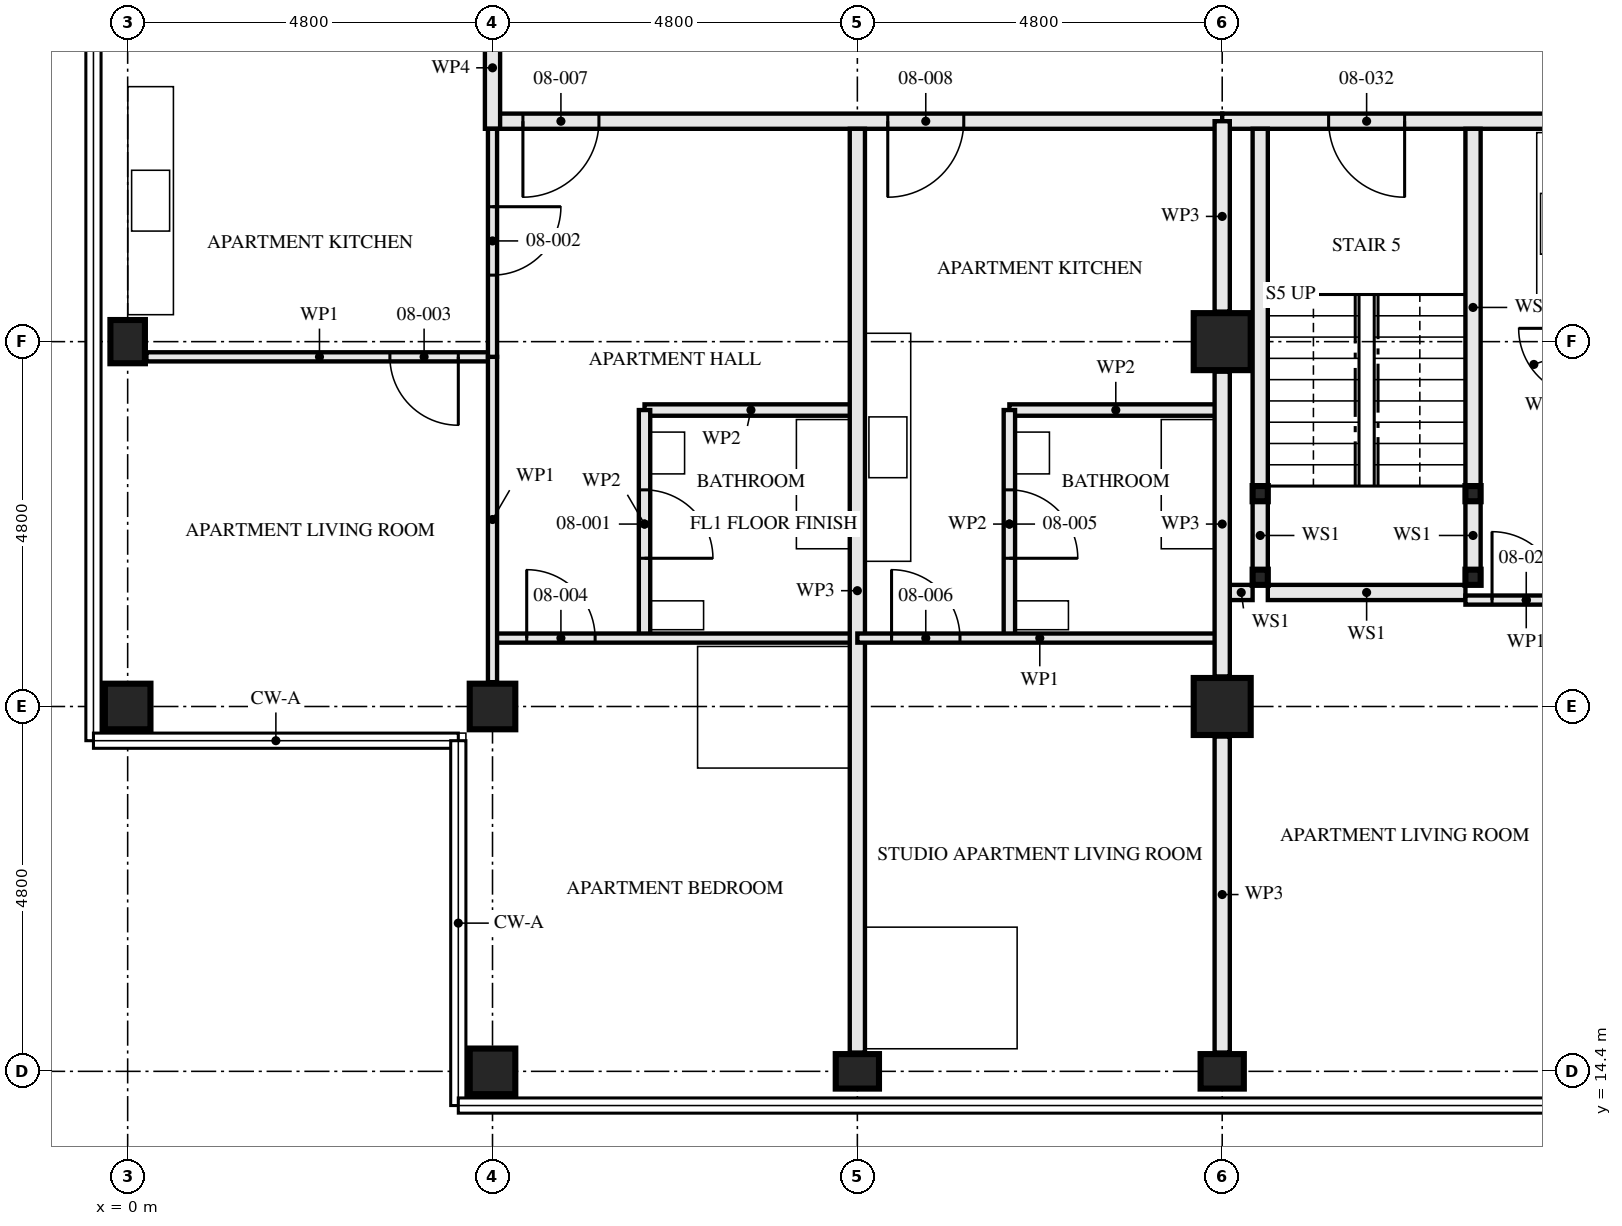
"""IFC4 building model, lengths in metres.
Left out: names, types, materials, properties, quantities, classifications, styles, units other than length and angle.
Written with IfcOpenShell. Run it as: python <this file> out.ifc"""

import sys

from ifc_helpers import new_model, si_unit, direction, frame, frame_2d, origin, origin_2d, place, context, subcontext, project, spatial, rectangle, hollow_rectangle, i_section, extrude, element, fill, save


model = new_model("IFC4")
c1 = context("Model", 3, precision=1e-05, world=origin(), true_north=direction((0.0, 1.0)))
c2 = subcontext(c1, "Body", "Model", "MODEL_VIEW")
j1 = project(units=[si_unit("LENGTHUNIT", "METRE"), si_unit("PLANEANGLEUNIT", "RADIAN")], contexts=[c1])
p1 = place(None, origin())
s1 = spatial("IfcSite", under=j1, at=p1, CompositionType="ELEMENT")
p2 = place(p1, origin())
s2 = spatial("IfcBuilding", under=s1, at=p2, CompositionType="ELEMENT")
p3 = place(p2, frame((0.0, 0.0, 34.0)))
s3 = spatial("IfcBuildingStorey", under=s2, at=p3, CompositionType="ELEMENT", Elevation=34.0)
p4 = place(p3, frame((0.0, 19.2, 0.0), z_axis=(0.0, 0.0, 1.0), x_axis=(0.0, 1.0, 0.0)))
e1 = element("IfcColumn", 1, at=p4, inside=s3, PredefinedType="COLUMN", context=c2, shape_type="SweptSolid", body=[
    extrude(hollow_rectangle(XDim=0.6, YDim=0.6, WallThickness=0.05, at=origin_2d()), origin(), (0.0, 0.0, 1.0), 3.5),
])
p5 = place(p3, frame((0.0, 24.0, 0.0), z_axis=(0.0, 0.0, 1.0), x_axis=(1.0, 0.0, 0.0)))
e2 = element("IfcColumn", 2, at=p5, inside=s3, PredefinedType="COLUMN", context=c2, shape_type="SweptSolid", body=[
    extrude(i_section(OverallWidth=0.454, OverallDepth=0.569, WebThickness=0.078, FlangeThickness=0.125, FilletRadius=0.015, at=origin_2d()), origin(), (0.0, 0.0, 1.0), 3.5),
])
for number, where, z_axis, x_axis in (
    (3, (4.8, 14.4, 0.0), (0.0, 0.0, 1.0), (0.0, 1.0, 0.0)),
    (4, (4.8, 19.2, 0.0), (0.0, 0.0, 1.0), (0.0, 1.0, 0.0)),
):
    element("IfcColumn", number, at=place(p3, frame(where, z_axis=z_axis, x_axis=x_axis)), inside=s3, PredefinedType="COLUMN", context=c2, shape_type="SweptSolid", body=[
        extrude(hollow_rectangle(XDim=0.6, YDim=0.6, WallThickness=0.05, at=origin_2d()), origin(), (0.0, 0.0, 1.0), 3.5),
    ])
for number, where, z_axis, x_axis in (
    (5, (9.6, 14.4, 0.0), (0.0, 0.0, 1.0), (0.0, 1.0, 0.0)),
    (6, (14.4, 14.4, 0.0), (0.0, 0.0, 1.0), (0.0, 1.0, 0.0)),
):
    element("IfcColumn", number, at=place(p3, frame(where, z_axis=z_axis, x_axis=x_axis)), inside=s3, PredefinedType="COLUMN", context=c2, shape_type="SweptSolid", body=[
        extrude(i_section(OverallWidth=0.454, OverallDepth=0.569, WebThickness=0.078, FlangeThickness=0.125, FilletRadius=0.015, at=origin_2d()), origin(), (0.0, 0.0, 1.0), 3.5),
    ])
for number, where, z_axis, x_axis in (
    (7, (14.4, 19.2, 0.0), (0.0, 0.0, 1.0), (1.0, 0.0, 0.0)),
    (8, (14.4, 24.0, 0.0), (0.0, 0.0, 1.0), (1.0, 0.0, 0.0)),
):
    element("IfcColumn", number, at=place(p3, frame(where, z_axis=z_axis, x_axis=x_axis)), inside=s3, PredefinedType="COLUMN", context=c2, shape_type="SweptSolid", body=[
        extrude(hollow_rectangle(XDim=0.75, YDim=0.75, WallThickness=0.08, at=origin_2d()), origin(), (0.0, 0.0, 1.0), 3.5),
    ])
for number, where, z_axis, x_axis in (
    (9, (14.9, 20.9, 0.0), (0.0, 0.0, 1.0), (1.0, 0.0, 0.0)),
    (10, (17.7, 20.9, 0.0), (0.0, 0.0, 1.0), (1.0, 0.0, 0.0)),
    (11, (14.9, 22.0, 0.0), (0.0, 0.0, 1.0), (1.0, 0.0, 0.0)),
    (12, (17.7, 22.0, 0.0), (0.0, 0.0, 1.0), (1.0, 0.0, 0.0)),
):
    element("IfcColumn", number, at=place(p3, frame(where, z_axis=z_axis, x_axis=x_axis)), inside=s3, PredefinedType="COLUMN", context=c2, shape_type="SweptSolid", body=[
        extrude(hollow_rectangle(XDim=0.2, YDim=0.2, WallThickness=0.008, at=origin_2d()), origin(), (0.0, 0.0, 1.0), 3.33),
    ])
p6 = place(p3, frame((6.8, 20.1, 0.0), z_axis=(0.0, 0.0, 1.0), x_axis=(0.0, 1.0, 0.0)))
e13 = element("IfcWall", 13, at=p6, inside=s3, PredefinedType="PARTITIONING", context=c2, shape_type="SweptSolid", body=[
    extrude(rectangle(XDim=3.0, YDim=0.15, at=frame_2d((1.5, 0.0))), origin(), (0.0, 0.0, 1.0), 3.33),
])
p7 = place(p6, frame((1.05, 0.0, 0.0)))
e14 = element("IfcOpeningElement", 14, at=p7, cuts=e13, PredefinedType="OPENING", context=c2, shape_type="SweptSolid", body=[
    extrude(rectangle(XDim=0.9, YDim=2.1, at=frame_2d((0.45, 1.05))), frame((0.0, 0.085, 0.0), z_axis=(0.0, -1.0, 0.0), x_axis=(1.0, 0.0, 0.0)), (0.0, 0.0, 1.0), 0.171),
])
p8 = place(p3, frame((6.8, 23.1, 0.0), z_axis=(0.0, 0.0, 1.0), x_axis=(1.0, 0.0, 0.0)))
e15 = element("IfcWall", 15, at=p8, inside=s3, PredefinedType="PARTITIONING", context=c2, shape_type="SweptSolid", body=[
    extrude(rectangle(XDim=2.8, YDim=0.15, at=frame_2d((1.4, 0.0))), origin(), (0.0, 0.0, 1.0), 3.33),
])
p9 = place(p3, frame((4.8, 23.8, 0.0), z_axis=(0.0, 0.0, 1.0), x_axis=(0.0, 1.0, 0.0)))
e16 = element("IfcWall", 16, at=p9, inside=s3, PredefinedType="PARTITIONING", context=c2, shape_type="SweptSolid", body=[
    extrude(rectangle(XDim=3.0, YDim=0.12, at=frame_2d((1.5, 0.0))), origin(), (0.0, 0.0, 1.0), 2.55),
])
p10 = place(p9, frame((1.075, 0.0, 0.0)))
e17 = element("IfcOpeningElement", 17, at=p10, cuts=e16, PredefinedType="OPENING", context=c2, shape_type="SweptSolid", body=[
    extrude(rectangle(XDim=0.9, YDim=2.1, at=frame_2d((0.45, 1.05))), frame((0.0, 0.071, 0.0), z_axis=(0.0, -1.0, 0.0), x_axis=(1.0, 0.0, 0.0)), (0.0, 0.0, 1.0), 0.141),
])
p11 = place(p3, frame((0.247, 23.8, 0.0), z_axis=(0.0, 0.0, 1.0), x_axis=(1.0, 0.0, 0.0)))
e18 = element("IfcWall", 18, at=p11, inside=s3, PredefinedType="PARTITIONING", context=c2, shape_type="SweptSolid", body=[
    extrude(rectangle(XDim=4.553, YDim=0.12, at=frame_2d((2.276, 0.0))), origin(), (0.0, 0.0, 1.0), 3.33),
])
p12 = place(p11, frame((3.203, 0.0, 0.0)))
e19 = element("IfcOpeningElement", 19, at=p12, cuts=e18, PredefinedType="OPENING", context=c2, shape_type="SweptSolid", body=[
    extrude(rectangle(XDim=0.9, YDim=2.1, at=frame_2d((0.45, 1.05))), frame((0.0, 0.071, 0.0), z_axis=(0.0, -1.0, 0.0), x_axis=(1.0, 0.0, 0.0)), (0.0, 0.0, 1.0), 0.141),
])
p13 = place(p3, frame((4.8, 20.1, 0.0), z_axis=(0.0, 0.0, 1.0), x_axis=(1.0, 0.0, 0.0)))
e20 = element("IfcWall", 20, at=p13, inside=s3, PredefinedType="PARTITIONING", context=c2, shape_type="SweptSolid", body=[
    extrude(rectangle(XDim=4.8, YDim=0.12, at=frame_2d((2.4, 0.0))), origin(), (0.0, 0.0, 1.0), 3.33),
])
p14 = place(p13, frame((0.45, 0.0, 0.0)))
e21 = element("IfcOpeningElement", 21, at=p14, cuts=e20, PredefinedType="OPENING", context=c2, shape_type="SweptSolid", body=[
    extrude(rectangle(XDim=0.9, YDim=2.1, at=frame_2d((0.45, 1.05))), frame((0.0, 0.071, 0.0), z_axis=(0.0, -1.0, 0.0), x_axis=(1.0, 0.0, 0.0)), (0.0, 0.0, 1.0), 0.141),
])
p15 = place(p3, frame((4.8, 19.52, 0.0), z_axis=(0.0, 0.0, 1.0), x_axis=(0.0, 1.0, 0.0)))
e22 = element("IfcWall", 22, at=p15, inside=s3, PredefinedType="PARTITIONING", context=c2, shape_type="SweptSolid", body=[
    extrude(rectangle(XDim=4.28, YDim=0.12, at=frame_2d((2.14, 0.0))), origin(), (0.0, 0.0, 1.0), 3.33),
])
p16 = place(p3, frame((9.6, 14.647, 0.0), z_axis=(0.0, 0.0, 1.0), x_axis=(0.0, 1.0, 0.0)))
e23 = element("IfcWall", 23, at=p16, inside=s3, PredefinedType="PARTITIONING", context=c2, shape_type="SweptSolid", body=[
    extrude(rectangle(XDim=12.153, YDim=0.2, at=frame_2d((6.077, 0.0))), origin(), (0.0, 0.0, 1.0), 2.55),
])
p17 = place(p3, frame((11.6, 20.1, 0.0), z_axis=(0.0, 0.0, 1.0), x_axis=(0.0, 1.0, 0.0)))
e24 = element("IfcWall", 24, at=p17, inside=s3, PredefinedType="PARTITIONING", context=c2, shape_type="SweptSolid", body=[
    extrude(rectangle(XDim=3.0, YDim=0.15, at=frame_2d((1.5, 0.0))), origin(), (0.0, 0.0, 1.0), 3.33),
])
p18 = place(p17, frame((1.05, 0.0, 0.0)))
e25 = element("IfcOpeningElement", 25, at=p18, cuts=e24, PredefinedType="OPENING", context=c2, shape_type="SweptSolid", body=[
    extrude(rectangle(XDim=0.9, YDim=2.1, at=frame_2d((0.45, 1.05))), frame((0.0, 0.085, 0.0), z_axis=(0.0, -1.0, 0.0), x_axis=(1.0, 0.0, 0.0)), (0.0, 0.0, 1.0), 0.171),
])
p19 = place(p3, frame((11.6, 23.1, 0.0), z_axis=(0.0, 0.0, 1.0), x_axis=(1.0, 0.0, 0.0)))
e26 = element("IfcWall", 26, at=p19, inside=s3, PredefinedType="PARTITIONING", context=c2, shape_type="SweptSolid", body=[
    extrude(rectangle(XDim=2.8, YDim=0.15, at=frame_2d((1.4, 0.0))), origin(), (0.0, 0.0, 1.0), 3.33),
])
p20 = place(p3, frame((9.6, 20.1, 0.0), z_axis=(0.0, 0.0, 1.0), x_axis=(1.0, 0.0, 0.0)))
e27 = element("IfcWall", 27, at=p20, inside=s3, PredefinedType="PARTITIONING", context=c2, shape_type="SweptSolid", body=[
    extrude(rectangle(XDim=4.8, YDim=0.12, at=frame_2d((2.4, 0.0))), origin(), (0.0, 0.0, 1.0), 3.33),
])
p21 = place(p20, frame((0.45, 0.0, 0.0)))
e28 = element("IfcOpeningElement", 28, at=p21, cuts=e27, PredefinedType="OPENING", context=c2, shape_type="SweptSolid", body=[
    extrude(rectangle(XDim=0.9, YDim=2.1, at=frame_2d((0.45, 1.05))), frame((0.0, 0.071, 0.0), z_axis=(0.0, -1.0, 0.0), x_axis=(1.0, 0.0, 0.0)), (0.0, 0.0, 1.0), 0.141),
])
p22 = place(p3, frame((4.8, 26.9, 0.0), z_axis=(0.0, 0.0, 1.0), x_axis=(1.0, 0.0, 0.0)))
e29 = element("IfcWall", 29, at=p22, inside=s3, PredefinedType="PARTITIONING", context=c2, shape_type="SweptSolid", body=[
    extrude(rectangle(XDim=9.6, YDim=0.2, at=frame_2d((4.8, 0.0))), origin(), (0.0, 0.0, 1.0), 3.33),
])
p23 = place(p22, frame((0.4, 0.0, 0.0)))
e30 = element("IfcOpeningElement", 30, at=p23, cuts=e29, PredefinedType="OPENING", context=c2, shape_type="SweptSolid", body=[
    extrude(rectangle(XDim=1.0, YDim=2.1, at=frame_2d((0.5, 1.05))), frame((0.0, 0.111, 0.0), z_axis=(0.0, -1.0, 0.0), x_axis=(1.0, 0.0, 0.0)), (0.0, 0.0, 1.0), 0.221),
])
p24 = place(p22, frame((5.2, 0.0, 0.0)))
e31 = element("IfcOpeningElement", 31, at=p24, cuts=e29, PredefinedType="OPENING", context=c2, shape_type="SweptSolid", body=[
    extrude(rectangle(XDim=1.0, YDim=2.1, at=frame_2d((0.5, 1.05))), frame((0.0, 0.111, 0.0), z_axis=(0.0, -1.0, 0.0), x_axis=(1.0, 0.0, 0.0)), (0.0, 0.0, 1.0), 0.221),
])
p25 = place(p3, frame((4.8, 26.8, 0.0), z_axis=(0.0, 0.0, 1.0), x_axis=(0.0, 1.0, 0.0)))
e32 = element("IfcWall", 32, at=p25, inside=s3, PredefinedType="PARTITIONING", context=c2, shape_type="SweptSolid", body=[
    extrude(rectangle(XDim=1.605, YDim=0.2, at=frame_2d((0.802, 0.0))), origin(), (0.0, 0.0, 1.0), 3.33),
])
p26 = place(p3, frame((14.9, 21.0, 0.0), z_axis=(0.0, 0.0, 1.0), x_axis=(0.0, 1.0, 0.0)))
e33 = element("IfcWall", 33, at=p26, inside=s3, PredefinedType="SOLIDWALL", context=c2, shape_type="SweptSolid", body=[
    extrude(rectangle(XDim=0.9, YDim=0.2, at=frame_2d((0.45, 0.0))), origin(), (0.0, 0.0, 1.0), 2.99),
])
p27 = place(p3, frame((14.9, 22.1, 0.0), z_axis=(0.0, 0.0, 1.0), x_axis=(0.0, 1.0, 0.0)))
e34 = element("IfcWall", 34, at=p27, inside=s3, PredefinedType="SOLIDWALL", context=c2, shape_type="SweptSolid", body=[
    extrude(rectangle(XDim=4.7, YDim=0.2, at=frame_2d((2.35, 0.0))), origin(), (0.0, 0.0, 1.0), 2.99),
])
p28 = place(p3, frame((17.7, 21.0, 0.0), z_axis=(0.0, 0.0, 1.0), x_axis=(0.0, 1.0, 0.0)))
e35 = element("IfcWall", 35, at=p28, inside=s3, PredefinedType="SOLIDWALL", context=c2, shape_type="SweptSolid", body=[
    extrude(rectangle(XDim=0.9, YDim=0.2, at=frame_2d((0.45, 0.0))), origin(), (0.0, 0.0, 1.0), 2.99),
])
p29 = place(p3, frame((17.7, 22.1, 0.0), z_axis=(0.0, 0.0, 1.0), x_axis=(0.0, 1.0, 0.0)))
e36 = element("IfcWall", 36, at=p29, inside=s3, PredefinedType="SOLIDWALL", context=c2, shape_type="SweptSolid", body=[
    extrude(rectangle(XDim=4.7, YDim=0.2, at=frame_2d((2.35, 0.0))), origin(), (0.0, 0.0, 1.0), 2.99),
])
p30 = place(p3, frame((14.5, 20.7, 0.0), z_axis=(0.0, 0.0, 1.0), x_axis=(1.0, 0.0, 0.0)))
e37 = element("IfcWall", 37, at=p30, inside=s3, PredefinedType="SOLIDWALL", context=c2, shape_type="SweptSolid", body=[
    extrude(rectangle(XDim=0.3, YDim=0.2, at=frame_2d((0.15, 0.0))), origin(), (0.0, 0.0, 1.0), 3.33),
])
p31 = place(p3, frame((15.0, 20.7, 0.0), z_axis=(0.0, 0.0, 1.0), x_axis=(1.0, 0.0, 0.0)))
e38 = element("IfcWall", 38, at=p31, inside=s3, PredefinedType="SOLIDWALL", context=c2, shape_type="SweptSolid", body=[
    extrude(rectangle(XDim=2.6, YDim=0.2, at=frame_2d((1.3, 0.0))), origin(), (0.0, 0.0, 1.0), 3.33),
])
p32 = place(p3, frame((17.6, 20.6, 0.0), z_axis=(0.0, 0.0, 1.0), x_axis=(1.0, 0.0, 0.0)))
e39 = element("IfcWall", 39, at=p32, inside=s3, PredefinedType="PARTITIONING", context=c2, shape_type="SweptSolid", body=[
    extrude(rectangle(XDim=1.6, YDim=0.12, at=frame_2d((0.8, 0.0))), origin(), (0.0, 0.0, 1.0), 3.33),
])
p33 = place(p32, frame((0.35, 0.0, 0.0)))
e40 = element("IfcOpeningElement", 40, at=p33, cuts=e39, PredefinedType="OPENING", context=c2, shape_type="SweptSolid", body=[
    extrude(rectangle(XDim=0.9, YDim=2.1, at=frame_2d((0.45, 1.05))), frame((0.0, 0.071, 0.0), z_axis=(0.0, -1.0, 0.0), x_axis=(1.0, 0.0, 0.0)), (0.0, 0.0, 1.0), 0.141),
])
p34 = place(p3, frame((14.4, 26.9, 0.0), z_axis=(0.0, 0.0, 1.0), x_axis=(1.0, 0.0, 0.0)))
e41 = element("IfcWall", 41, at=p34, inside=s3, PredefinedType="PARTITIONING", context=c2, shape_type="SweptSolid", body=[
    extrude(rectangle(XDim=14.4, YDim=0.2, at=frame_2d((7.2, 0.0))), origin(), (0.0, 0.0, 1.0), 2.55),
])
p35 = place(p34, frame((1.4, 0.0, 0.0)))
e42 = element("IfcOpeningElement", 42, at=p35, cuts=e41, PredefinedType="OPENING", context=c2, shape_type="SweptSolid", body=[
    extrude(rectangle(XDim=1.0, YDim=2.1, at=frame_2d((0.5, 1.05))), frame((0.0, 0.111, 0.0), z_axis=(0.0, -1.0, 0.0), x_axis=(1.0, 0.0, 0.0)), (0.0, 0.0, 1.0), 0.221),
])
p36 = place(p34, frame((5.2, 0.0, 0.0)))
e43 = element("IfcOpeningElement", 43, at=p36, cuts=e41, PredefinedType="OPENING", context=c2, shape_type="SweptSolid", body=[
    extrude(rectangle(XDim=1.0, YDim=2.1, at=frame_2d((0.5, 1.05))), frame((0.0, 0.111, 0.0), z_axis=(0.0, -1.0, 0.0), x_axis=(1.0, 0.0, 0.0)), (0.0, 0.0, 1.0), 0.221),
])
p37 = place(p34, frame((10.0, 0.0, 0.0)))
e44 = element("IfcOpeningElement", 44, at=p37, cuts=e41, PredefinedType="OPENING", context=c2, shape_type="SweptSolid", body=[
    extrude(rectangle(XDim=1.0, YDim=2.1, at=frame_2d((0.5, 1.05))), frame((0.0, 0.111, 0.0), z_axis=(0.0, -1.0, 0.0), x_axis=(1.0, 0.0, 0.0)), (0.0, 0.0, 1.0), 0.221),
])
p38 = place(p3, frame((14.4, 14.647, 0.0), z_axis=(0.0, 0.0, 1.0), x_axis=(0.0, 1.0, 0.0)))
e45 = element("IfcWall", 45, at=p38, inside=s3, PredefinedType="PARTITIONING", context=c2, shape_type="SweptSolid", body=[
    extrude(rectangle(XDim=4.158, YDim=0.2, at=frame_2d((2.079, 0.0))), origin(), (0.0, 0.0, 1.0), 2.32),
])
p39 = place(p3, frame((14.4, 19.595, 0.0), z_axis=(0.0, 0.0, 1.0), x_axis=(0.0, 1.0, 0.0)))
e46 = element("IfcWall", 46, at=p39, inside=s3, PredefinedType="PARTITIONING", context=c2, shape_type="SweptSolid", body=[
    extrude(rectangle(XDim=4.01, YDim=0.2, at=frame_2d((2.005, 0.0))), origin(), (0.0, 0.0, 1.0), 2.32),
])
p40 = place(p3, frame((14.4, 24.395, 0.0), z_axis=(0.0, 0.0, 1.0), x_axis=(0.0, 1.0, 0.0)))
e47 = element("IfcWall", 47, at=p40, inside=s3, PredefinedType="PARTITIONING", context=c2, shape_type="SweptSolid", body=[
    extrude(rectangle(XDim=2.505, YDim=0.2, at=frame_2d((1.252, 0.0))), origin(), (0.0, 0.0, 1.0), 2.32),
])
p41 = place(p7, frame((0.9, 0.0, 0.0), z_axis=(0.0, 0.0, 1.0), x_axis=(-1.0, 0.0, 0.0)))
e48 = element("IfcDoor", 48, at=p41, inside=s3, OperationType="SINGLE_SWING_LEFT", PredefinedType="DOOR", context=c2, shape_type="SweptSolid", body=[
    extrude(rectangle(XDim=0.9, YDim=2.1, at=frame_2d((0.45, 1.05))), frame((0.0, 0.022, 0.0), z_axis=(0.0, -1.0, 0.0), x_axis=(1.0, 0.0, 0.0)), (0.0, 0.0, 1.0), 0.044),
])
fill(e14, e48)
p42 = place(p10, frame((0.9, 0.0, 0.0), z_axis=(0.0, 0.0, 1.0), x_axis=(-1.0, 0.0, 0.0)))
e49 = element("IfcDoor", 49, at=p42, inside=s3, OperationType="SINGLE_SWING_RIGHT", PredefinedType="DOOR", context=c2, shape_type="SweptSolid", body=[
    extrude(rectangle(XDim=0.9, YDim=2.1, at=frame_2d((0.45, 1.05))), frame((0.0, 0.022, 0.0), z_axis=(0.0, -1.0, 0.0), x_axis=(1.0, 0.0, 0.0)), (0.0, 0.0, 1.0), 0.044),
])
fill(e17, e49)
p43 = place(p12, frame((0.9, 0.0, 0.0), z_axis=(0.0, 0.0, 1.0), x_axis=(-1.0, 0.0, 0.0)))
e50 = element("IfcDoor", 50, at=p43, inside=s3, OperationType="SINGLE_SWING_RIGHT", PredefinedType="DOOR", context=c2, shape_type="SweptSolid", body=[
    extrude(rectangle(XDim=0.9, YDim=2.1, at=frame_2d((0.45, 1.05))), frame((0.0, 0.022, 0.0), z_axis=(0.0, -1.0, 0.0), x_axis=(1.0, 0.0, 0.0)), (0.0, 0.0, 1.0), 0.044),
])
fill(e19, e50)
p44 = place(p14, origin())
e51 = element("IfcDoor", 51, at=p44, inside=s3, OperationType="SINGLE_SWING_RIGHT", PredefinedType="DOOR", context=c2, shape_type="SweptSolid", body=[
    extrude(rectangle(XDim=0.9, YDim=2.1, at=frame_2d((0.45, 1.05))), frame((0.0, 0.022, 0.0), z_axis=(0.0, -1.0, 0.0), x_axis=(1.0, 0.0, 0.0)), (0.0, 0.0, 1.0), 0.044),
])
fill(e21, e51)
p45 = place(p18, frame((0.9, 0.0, 0.0), z_axis=(0.0, 0.0, 1.0), x_axis=(-1.0, 0.0, 0.0)))
e52 = element("IfcDoor", 52, at=p45, inside=s3, OperationType="SINGLE_SWING_LEFT", PredefinedType="DOOR", context=c2, shape_type="SweptSolid", body=[
    extrude(rectangle(XDim=0.9, YDim=2.1, at=frame_2d((0.45, 1.05))), frame((0.0, 0.022, 0.0), z_axis=(0.0, -1.0, 0.0), x_axis=(1.0, 0.0, 0.0)), (0.0, 0.0, 1.0), 0.044),
])
fill(e25, e52)
p46 = place(p21, origin())
e53 = element("IfcDoor", 53, at=p46, inside=s3, OperationType="SINGLE_SWING_RIGHT", PredefinedType="DOOR", context=c2, shape_type="SweptSolid", body=[
    extrude(rectangle(XDim=0.9, YDim=2.1, at=frame_2d((0.45, 1.05))), frame((0.0, 0.022, 0.0), z_axis=(0.0, -1.0, 0.0), x_axis=(1.0, 0.0, 0.0)), (0.0, 0.0, 1.0), 0.044),
])
fill(e28, e53)
p47 = place(p23, frame((1.0, 0.0, 0.0), z_axis=(0.0, 0.0, 1.0), x_axis=(-1.0, 0.0, 0.0)))
e54 = element("IfcDoor", 54, at=p47, inside=s3, OperationType="SINGLE_SWING_LEFT", PredefinedType="DOOR", context=c2, shape_type="SweptSolid", body=[
    extrude(rectangle(XDim=1.0, YDim=2.1, at=frame_2d((0.5, 1.05))), frame((0.0, 0.027, 0.0), z_axis=(0.0, -1.0, 0.0), x_axis=(1.0, 0.0, 0.0)), (0.0, 0.0, 1.0), 0.054),
])
fill(e30, e54)
p48 = place(p24, frame((1.0, 0.0, 0.0), z_axis=(0.0, 0.0, 1.0), x_axis=(-1.0, 0.0, 0.0)))
e55 = element("IfcDoor", 55, at=p48, inside=s3, OperationType="SINGLE_SWING_LEFT", PredefinedType="DOOR", context=c2, shape_type="SweptSolid", body=[
    extrude(rectangle(XDim=1.0, YDim=2.1, at=frame_2d((0.5, 1.05))), frame((0.0, 0.027, 0.0), z_axis=(0.0, -1.0, 0.0), x_axis=(1.0, 0.0, 0.0)), (0.0, 0.0, 1.0), 0.054),
])
fill(e31, e55)
p49 = place(p33, origin())
e56 = element("IfcDoor", 56, at=p49, inside=s3, OperationType="SINGLE_SWING_RIGHT", PredefinedType="DOOR", context=c2, shape_type="SweptSolid", body=[
    extrude(rectangle(XDim=0.9, YDim=2.1, at=frame_2d((0.45, 1.05))), frame((0.0, 0.022, 0.0), z_axis=(0.0, -1.0, 0.0), x_axis=(1.0, 0.0, 0.0)), (0.0, 0.0, 1.0), 0.044),
])
fill(e40, e56)
p50 = place(p35, frame((1.0, 0.0, 0.0), z_axis=(0.0, 0.0, 1.0), x_axis=(-1.0, 0.0, 0.0)))
e57 = element("IfcDoor", 57, at=p50, inside=s3, OperationType="SINGLE_SWING_RIGHT", PredefinedType="DOOR", context=c2, shape_type="SweptSolid", body=[
    extrude(rectangle(XDim=1.0, YDim=2.1, at=frame_2d((0.5, 1.05))), frame((0.0, 0.032, 0.0), z_axis=(0.0, -1.0, 0.0), x_axis=(1.0, 0.0, 0.0)), (0.0, 0.0, 1.0), 0.064),
])
fill(e42, e57)
save(model, sys.argv[1])
